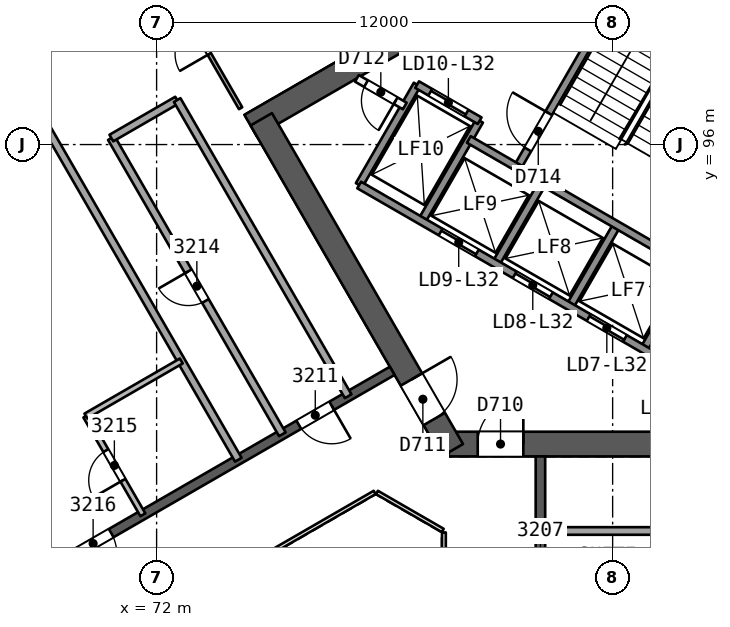
"""IFC4 building model, lengths in metres.
Left out: names, types, materials, properties, quantities, classifications, styles, units other than length and angle.
Written with IfcOpenShell. Run it as: python <this file> out.ifc"""

import sys

from ifc_helpers import new_model, si_unit, direction, frame, frame_2d, origin, place, context, subcontext, project, spatial, rectangle, extrude, element, fill, save


model = new_model("IFC4")
c1 = context("Model", 3, precision=1e-05, world=origin(), true_north=direction((0.0, 1.0)))
c2 = subcontext(c1, "Body", "Model", "MODEL_VIEW")
j1 = project(units=[si_unit("LENGTHUNIT", "METRE"), si_unit("PLANEANGLEUNIT", "RADIAN")], contexts=[c1])
p1 = place(None, origin())
s1 = spatial("IfcSite", under=j1, at=p1, CompositionType="ELEMENT")
p2 = place(p1, origin())
s2 = spatial("IfcBuilding", under=s1, at=p2, CompositionType="ELEMENT")
p3 = place(p2, frame((0.0, 0.0, 132.7)))
s3 = spatial("IfcBuildingStorey", under=s2, at=p3, CompositionType="ELEMENT", Elevation=132.7)
p4 = place(p3, frame((79.688, 88.119, 0.0), z_axis=(0.0, 0.0, 1.0), x_axis=(1.0, 0.0, 0.0)))
e1 = element("IfcWall", 1, at=p4, inside=s3, PredefinedType="SHEAR", context=c2, shape_type="SweptSolid", body=[
    extrude(rectangle(XDim=10.192, YDim=0.65, at=frame_2d((5.096, 0.0))), origin(), (0.0, 0.0, 1.0), 3.7),
])
p5 = place(p4, frame((0.762, 0.0, 0.0)))
e2 = element("IfcOpeningElement", 2, at=p5, cuts=e1, PredefinedType="OPENING", context=c2, shape_type="SweptSolid", body=[
    extrude(rectangle(XDim=1.2, YDim=2.1, at=frame_2d((0.6, 1.05))), frame((0.0, 0.335, 0.0), z_axis=(0.0, -1.0, 0.0), x_axis=(1.0, 0.0, 0.0)), (0.0, 0.0, 1.0), 0.671),
])
p6 = place(p3, frame((86.723, 103.575, 0.0), z_axis=(0.0, 0.0, 1.0), x_axis=(-0.866031824457, -0.499988878904, 0.0)))
e3 = element("IfcWall", 3, at=p6, inside=s3, PredefinedType="SHEAR", context=c2, shape_type="SweptSolid", body=[
    extrude(rectangle(XDim=14.146, YDim=0.65, at=frame_2d((7.073, 0.0))), origin(), (0.0, 0.0, 1.0), 3.7),
])
p7 = place(p3, frame((74.754, 96.665, 0.0), z_axis=(0.0, 0.0, 1.0), x_axis=(0.500011799426, -0.866018591275, 0.0)))
e4 = element("IfcWall", 4, at=p7, inside=s3, PredefinedType="SHEAR", context=c2, shape_type="SweptSolid", body=[
    extrude(rectangle(XDim=10.055, YDim=0.65, at=frame_2d((5.027, 0.0))), origin(), (0.0, 0.0, 1.0), 3.7),
])
p8 = place(p7, frame((7.905, 0.0, 0.0)))
e5 = element("IfcOpeningElement", 5, at=p8, cuts=e4, PredefinedType="OPENING", context=c2, shape_type="SweptSolid", body=[
    extrude(rectangle(XDim=1.2, YDim=2.1, at=frame_2d((0.6, 1.05))), frame((0.0, 0.335, 0.0), z_axis=(0.0, -1.0, 0.0), x_axis=(1.0, 0.0, 0.0)), (0.0, 0.0, 1.0), 0.671),
])
p9 = place(p3, frame((82.1, 72.206, 0.0), z_axis=(0.0, 0.0, 1.0), x_axis=(0.0, 1.0, 0.0)))
e6 = element("IfcWall", 6, at=p9, inside=s3, PredefinedType="SHEAR", context=c2, shape_type="SweptSolid", body=[
    extrude(rectangle(XDim=15.588, YDim=0.25, at=frame_2d((7.794, 0.0))), origin(), (0.0, 0.0, 1.0), 3.25),
])
p10 = place(p9, frame((2.306, 0.0, 0.0)))
e7 = element("IfcOpeningElement", 7, at=p10, cuts=e6, PredefinedType="OPENING", context=c2, shape_type="SweptSolid", body=[
    extrude(rectangle(XDim=1.0, YDim=2.1, at=frame_2d((0.5, 1.05))), frame((0.0, 0.135, 0.0), z_axis=(0.0, -1.0, 0.0), x_axis=(1.0, 0.0, 0.0)), (0.0, 0.0, 1.0), 0.271),
])
p11 = place(p9, frame((8.415, 0.0, 0.0)))
e8 = element("IfcOpeningElement", 8, at=p11, cuts=e6, PredefinedType="OPENING", context=c2, shape_type="SweptSolid", body=[
    extrude(rectangle(XDim=1.0, YDim=2.1, at=frame_2d((0.5, 1.05))), frame((0.0, 0.135, 0.0), z_axis=(0.0, -1.0, 0.0), x_axis=(1.0, 0.0, 0.0)), (0.0, 0.0, 1.0), 0.271),
])
p12 = place(p9, frame((12.127, 0.0, 0.0)))
e9 = element("IfcOpeningElement", 9, at=p12, cuts=e6, PredefinedType="OPENING", context=c2, shape_type="SweptSolid", body=[
    extrude(rectangle(XDim=1.0, YDim=2.1, at=frame_2d((0.5, 1.05))), frame((0.0, 0.135, 0.0), z_axis=(0.0, -1.0, 0.0), x_axis=(1.0, 0.0, 0.0)), (0.0, 0.0, 1.0), 0.271),
])
p13 = place(p3, frame((78.2, 90.046, 0.0), z_axis=(0.0, 0.0, 1.0), x_axis=(-0.866026492143, -0.499998114903, 0.0)))
e10 = element("IfcWall", 10, at=p13, inside=s3, PredefinedType="SHEAR", context=c2, shape_type="SweptSolid", body=[
    extrude(rectangle(XDim=15.588, YDim=0.25, at=frame_2d((7.794, 0.0))), origin(), (0.0, 0.0, 1.0), 3.25),
])
p14 = place(p13, frame((1.838, 0.0, 0.0)))
e11 = element("IfcOpeningElement", 11, at=p14, cuts=e10, PredefinedType="OPENING", context=c2, shape_type="SweptSolid", body=[
    extrude(rectangle(XDim=1.0, YDim=2.1, at=frame_2d((0.5, 1.05))), frame((0.0, 0.135, 0.0), z_axis=(0.0, -1.0, 0.0), x_axis=(1.0, 0.0, 0.0)), (0.0, 0.0, 1.0), 0.271),
])
p15 = place(p13, frame((8.538, 0.0, 0.0)))
e12 = element("IfcOpeningElement", 12, at=p15, cuts=e10, PredefinedType="OPENING", context=c2, shape_type="SweptSolid", body=[
    extrude(rectangle(XDim=1.1, YDim=2.1, at=frame_2d((0.55, 1.05))), frame((0.0, 0.135, 0.0), z_axis=(0.0, -1.0, 0.0), x_axis=(1.0, 0.0, 0.0)), (0.0, 0.0, 1.0), 0.271),
])
p16 = place(p13, frame((12.594, 0.0, 0.0)))
e13 = element("IfcOpeningElement", 13, at=p16, cuts=e10, PredefinedType="OPENING", context=c2, shape_type="SweptSolid", body=[
    extrude(rectangle(XDim=1.0, YDim=2.1, at=frame_2d((0.5, 1.05))), frame((0.0, 0.135, 0.0), z_axis=(0.0, -1.0, 0.0), x_axis=(1.0, 0.0, 0.0)), (0.0, 0.0, 1.0), 0.271),
])
p17 = place(p3, frame((82.1, 85.833, 0.0), z_axis=(0.0, 0.0, 1.0), x_axis=(1.0, 0.0, 0.0)))
e14 = element("IfcWall", 14, at=p17, inside=s3, PredefinedType="PARTITIONING", context=c2, shape_type="SweptSolid", body=[
    extrude(rectangle(XDim=9.0, YDim=0.2, at=frame_2d((4.5, 0.0))), origin(), (0.0, 0.0, 1.0), 3.25),
])
p18 = place(p17, frame((4.05, 0.0, 0.0)))
e15 = element("IfcOpeningElement", 15, at=p18, cuts=e14, PredefinedType="OPENING", context=c2, shape_type="SweptSolid", body=[
    extrude(rectangle(XDim=0.9, YDim=2.1, at=frame_2d((0.45, 1.05))), frame((0.0, 0.11, 0.0), z_axis=(0.0, -1.0, 0.0), x_axis=(1.0, 0.0, 0.0)), (0.0, 0.0, 1.0), 0.221),
])
p19 = place(p3, frame((74.21, 96.956, 0.0), z_axis=(0.0, 0.0, 1.0), x_axis=(-0.49999760543, 0.866026786286, 0.0)))
e16 = element("IfcWall", 16, at=p19, inside=s3, PredefinedType="PARTITIONING", context=c2, shape_type="SweptSolid", body=[
    extrude(rectangle(XDim=4.199, YDim=0.1, at=frame_2d((2.099, 0.0))), origin(), (0.0, 0.0, 1.0), 3.25),
])
p20 = place(p19, frame((1.649, 0.0, 0.0)))
e17 = element("IfcOpeningElement", 17, at=p20, cuts=e16, PredefinedType="OPENING", context=c2, shape_type="SweptSolid", body=[
    extrude(rectangle(XDim=0.9, YDim=2.1, at=frame_2d((0.45, 1.05))), frame((0.0, 0.061, 0.0), z_axis=(0.0, -1.0, 0.0), x_axis=(1.0, 0.0, 0.0)), (0.0, 0.0, 1.0), 0.121),
])
p21 = place(p3, frame((75.309, 88.377, 0.0), z_axis=(0.0, 0.0, 1.0), x_axis=(-0.5000018851, 0.866024315419, 0.0)))
e18 = element("IfcWall", 18, at=p21, inside=s3, PredefinedType="PARTITIONING", context=c2, shape_type="SweptSolid", body=[
    extrude(rectangle(XDim=9.0, YDim=0.2, at=frame_2d((4.5, 0.0))), origin(), (0.0, 0.0, 1.0), 3.25),
])
p22 = place(p21, frame((4.05, 0.0, 0.0)))
e19 = element("IfcOpeningElement", 19, at=p22, cuts=e18, PredefinedType="OPENING", context=c2, shape_type="SweptSolid", body=[
    extrude(rectangle(XDim=0.9, YDim=2.1, at=frame_2d((0.45, 1.05))), frame((0.0, 0.11, 0.0), z_axis=(0.0, -1.0, 0.0), x_axis=(1.0, 0.0, 0.0)), (0.0, 0.0, 1.0), 0.221),
])
p23 = place(p3, frame((70.809, 96.171, 0.0), z_axis=(0.0, 0.0, 1.0), x_axis=(0.866010750942, 0.50002537861, 0.0)))
e20 = element("IfcWall", 20, at=p23, inside=s3, PredefinedType="PARTITIONING", context=c2, shape_type="SweptSolid", body=[
    extrude(rectangle(XDim=2.0, YDim=0.2, at=frame_2d((1.0, 0.0))), origin(), (0.0, 0.0, 1.0), 3.25),
])
p24 = place(p3, frame((72.541, 97.171, 0.0), z_axis=(0.0, 0.0, 1.0), x_axis=(0.5000018851, -0.866024315419, 0.0)))
e21 = element("IfcWall", 21, at=p24, inside=s3, PredefinedType="PARTITIONING", context=c2, shape_type="SweptSolid", body=[
    extrude(rectangle(XDim=9.0, YDim=0.2, at=frame_2d((4.5, 0.0))), origin(), (0.0, 0.0, 1.0), 3.25),
])
p25 = place(p3, frame((68.061, 98.254, 0.0), z_axis=(0.0, 0.0, 1.0), x_axis=(0.499987977232, -0.866032345022, 0.0)))
e22 = element("IfcWall", 22, at=p25, inside=s3, PredefinedType="PARTITIONING", context=c2, shape_type="SweptSolid", body=[
    extrude(rectangle(XDim=12.177, YDim=0.2, at=frame_2d((6.089, 0.0))), origin(), (0.0, 0.0, 1.0), 3.25),
])
p26 = place(p3, frame((71.638, 86.258, 0.0), z_axis=(0.0, 0.0, 1.0), x_axis=(-0.499990139034, 0.866031096941, 0.0)))
e23 = element("IfcWall", 23, at=p26, inside=s3, PredefinedType="PARTITIONING", context=c2, shape_type="SweptSolid", body=[
    extrude(rectangle(XDim=3.0, YDim=0.15, at=frame_2d((1.5, 0.0))), origin(), (0.0, 0.0, 1.0), 3.25),
])
p27 = place(p26, frame((1.05, 0.0, 0.0)))
e24 = element("IfcOpeningElement", 24, at=p27, cuts=e23, PredefinedType="OPENING", context=c2, shape_type="SweptSolid", body=[
    extrude(rectangle(XDim=0.9, YDim=2.1, at=frame_2d((0.45, 1.05))), frame((0.0, 0.085, 0.0), z_axis=(0.0, -1.0, 0.0), x_axis=(1.0, 0.0, 0.0)), (0.0, 0.0, 1.0), 0.171),
])
p28 = place(p3, frame((70.138, 88.856, 0.0), z_axis=(0.0, 0.0, 1.0), x_axis=(0.866032775405, 0.499987231761, 0.0)))
e25 = element("IfcWall", 25, at=p28, inside=s3, PredefinedType="PARTITIONING", context=c2, shape_type="SweptSolid", body=[
    extrude(rectangle(XDim=2.9, YDim=0.15, at=frame_2d((1.45, 0.0))), origin(), (0.0, 0.0, 1.0), 3.25),
])
p29 = place(p3, frame((41.097, 82.858, 0.0), z_axis=(0.0, 0.0, 1.0), x_axis=(0.866026276916, 0.499998487688, 0.0)))
e26 = element("IfcWall", 26, at=p29, inside=s3, PredefinedType="SOLIDWALL", context=c2, shape_type="SweptSolid", body=[
    extrude(rectangle(XDim=55.864, YDim=0.3, at=frame_2d((27.932, 0.0))), origin(), (0.0, 0.0, 1.0), 3.25),
])
p30 = place(p29, frame((26.888, 0.0, 0.0)))
e27 = element("IfcOpeningElement", 27, at=p30, cuts=e26, PredefinedType="OPENING", context=c2, shape_type="SweptSolid", body=[
    extrude(rectangle(XDim=2.4, YDim=2.4, at=frame_2d((1.2, 1.2))), frame((0.0, 0.161, 0.0), z_axis=(0.0, -1.0, 0.0), x_axis=(1.0, 0.0, 0.0)), (0.0, 0.0, 1.0), 0.321),
])
p31 = place(p29, frame((32.188, 0.0, 0.0)))
e28 = element("IfcOpeningElement", 28, at=p31, cuts=e26, PredefinedType="OPENING", context=c2, shape_type="SweptSolid", body=[
    extrude(rectangle(XDim=2.4, YDim=2.4, at=frame_2d((1.2, 1.2))), frame((0.0, 0.161, 0.0), z_axis=(0.0, -1.0, 0.0), x_axis=(1.0, 0.0, 0.0)), (0.0, 0.0, 1.0), 0.321),
])
p32 = place(p29, frame((43.384, 0.0, 0.0)))
e29 = element("IfcOpeningElement", 29, at=p32, cuts=e26, PredefinedType="OPENING", context=c2, shape_type="SweptSolid", body=[
    extrude(rectangle(XDim=2.4, YDim=2.4, at=frame_2d((1.2, 1.2))), frame((0.0, 0.161, 0.0), z_axis=(0.0, -1.0, 0.0), x_axis=(1.0, 0.0, 0.0)), (0.0, 0.0, 1.0), 0.321),
])
p33 = place(p29, frame((21.432, 0.0, 0.0)))
e30 = element("IfcOpeningElement", 30, at=p33, cuts=e26, PredefinedType="OPENING", context=c2, shape_type="SweptSolid", body=[
    extrude(rectangle(XDim=2.4, YDim=2.4, at=frame_2d((1.2, 1.2))), frame((0.0, 0.161, 0.0), z_axis=(0.0, -1.0, 0.0), x_axis=(1.0, 0.0, 0.0)), (0.0, 0.0, 1.0), 0.321),
])
p34 = place(p29, frame((10.029, 0.0, 0.0)))
e31 = element("IfcOpeningElement", 31, at=p34, cuts=e26, PredefinedType="OPENING", context=c2, shape_type="SweptSolid", body=[
    extrude(rectangle(XDim=2.4, YDim=2.4, at=frame_2d((1.2, 1.2))), frame((0.0, 0.161, 0.0), z_axis=(0.0, -1.0, 0.0), x_axis=(1.0, 0.0, 0.0)), (0.0, 0.0, 1.0), 0.321),
])
for number, where, z_axis, x_axis in (
    (32, (84.821, 90.611, 0.0), (0.0, 0.0, 1.0), (0.5, 0.866, 0.0)),
    (33, (82.873, 91.736, 0.0), (0.0, 0.0, 1.0), (0.5, 0.866, 0.0)),
    (34, (80.924, 92.861, 0.0), (0.0, 0.0, 1.0), (0.5, 0.866, 0.0)),
):
    element("IfcWall", number, at=place(p3, frame(where, z_axis=z_axis, x_axis=x_axis)), inside=s3, PredefinedType="SOLIDWALL", context=c2, shape_type="SweptSolid", body=[
        extrude(rectangle(XDim=2.48, YDim=0.2, at=frame_2d((1.24, 0.0))), origin(), (0.0, 0.0, 1.0), 3.25),
    ])
p35 = place(p3, frame((81.493, 95.396, 0.0), z_axis=(0.0, 0.0, 1.0), x_axis=(0.500006057782, 0.866021906294, 0.0)))
e35 = element("IfcWall", 35, at=p35, inside=s3, PredefinedType="SOLIDWALL", context=c2, shape_type="SweptSolid", body=[
    extrude(rectangle(XDim=7.7, YDim=0.2, at=frame_2d((3.85, 0.0))), origin(), (0.0, 0.0, 1.0), 3.25),
])
p36 = place(p35, frame((0.55, 0.0, 0.0)))
e36 = element("IfcOpeningElement", 36, at=p36, cuts=e35, PredefinedType="OPENING", context=c2, shape_type="SweptSolid", body=[
    extrude(rectangle(XDim=1.1, YDim=2.1, at=frame_2d((0.55, 1.05))), frame((0.0, 0.11, 0.0), z_axis=(0.0, -1.0, 0.0), x_axis=(1.0, 0.0, 0.0)), (0.0, 0.0, 1.0), 0.221),
])
for number, where, z_axis, x_axis in (
    (37, (78.976, 93.986, 0.0), (0.0, 0.0, 1.0), (0.5, 0.866, 0.0)),
    (38, (77.33, 94.936, 0.0), (0.0, 0.0, 1.0), (0.5, 0.866, 0.0)),
):
    element("IfcWall", number, at=place(p3, frame(where, z_axis=z_axis, x_axis=x_axis)), inside=s3, PredefinedType="SOLIDWALL", context=c2, shape_type="SweptSolid", body=[
        extrude(rectangle(XDim=3.05, YDim=0.2, at=frame_2d((1.525, 0.0))), origin(), (0.0, 0.0, 1.0), 3.25),
    ])
p37 = place(p3, frame((86.77, 89.486, 0.0), z_axis=(0.0, 0.0, 1.0), x_axis=(-0.86601811187, 0.500012629753, 0.0)))
e39 = element("IfcWall", 39, at=p37, inside=s3, PredefinedType="SOLIDWALL", context=c2, shape_type="SweptSolid", body=[
    extrude(rectangle(XDim=10.9, YDim=0.2, at=frame_2d((5.45, 0.0))), origin(), (0.0, 0.0, 1.0), 3.25),
])
p38 = place(p37, frame((0.575, 0.0, 0.0)))
e40 = element("IfcOpeningElement", 40, at=p38, cuts=e39, PredefinedType="OPENING", context=c2, shape_type="SweptSolid", body=[
    extrude(rectangle(XDim=1.1, YDim=2.1, at=frame_2d((0.55, 1.05))), frame((0.0, 0.11, 0.0), z_axis=(0.0, -1.0, 0.0), x_axis=(1.0, 0.0, 0.0)), (0.0, 0.0, 1.0), 0.221),
])
p39 = place(p37, frame((2.825, 0.0, 0.0)))
e41 = element("IfcOpeningElement", 41, at=p39, cuts=e39, PredefinedType="OPENING", context=c2, shape_type="SweptSolid", body=[
    extrude(rectangle(XDim=1.1, YDim=2.1, at=frame_2d((0.55, 1.05))), frame((0.0, 0.11, 0.0), z_axis=(0.0, -1.0, 0.0), x_axis=(1.0, 0.0, 0.0)), (0.0, 0.0, 1.0), 0.221),
])
p40 = place(p37, frame((5.075, 0.0, 0.0)))
e42 = element("IfcOpeningElement", 42, at=p40, cuts=e39, PredefinedType="OPENING", context=c2, shape_type="SweptSolid", body=[
    extrude(rectangle(XDim=1.1, YDim=2.1, at=frame_2d((0.55, 1.05))), frame((0.0, 0.11, 0.0), z_axis=(0.0, -1.0, 0.0), x_axis=(1.0, 0.0, 0.0)), (0.0, 0.0, 1.0), 0.221),
])
p41 = place(p37, frame((7.325, 0.0, 0.0)))
e43 = element("IfcOpeningElement", 43, at=p41, cuts=e39, PredefinedType="OPENING", context=c2, shape_type="SweptSolid", body=[
    extrude(rectangle(XDim=1.1, YDim=2.1, at=frame_2d((0.55, 1.05))), frame((0.0, 0.11, 0.0), z_axis=(0.0, -1.0, 0.0), x_axis=(1.0, 0.0, 0.0)), (0.0, 0.0, 1.0), 0.221),
])
p42 = place(p3, frame((78.53, 97.014, 0.0), z_axis=(0.0, 0.0, 1.0), x_axis=(-0.866045896294, 0.499964504253, 0.0)))
e44 = element("IfcWall", 44, at=p42, inside=s3, PredefinedType="PARTITIONING", context=c2, shape_type="SweptSolid", body=[
    extrude(rectangle(XDim=1.455, YDim=0.2, at=frame_2d((0.728, 0.0))), origin(), (0.0, 0.0, 1.0), 3.25),
])
p43 = place(p42, frame((0.278, 0.0, 0.0)))
e45 = element("IfcOpeningElement", 45, at=p43, cuts=e44, PredefinedType="OPENING", context=c2, shape_type="SweptSolid", body=[
    extrude(rectangle(XDim=0.9, YDim=2.1, at=frame_2d((0.45, 1.05))), frame((0.0, 0.11, 0.0), z_axis=(0.0, -1.0, 0.0), x_axis=(1.0, 0.0, 0.0)), (0.0, 0.0, 1.0), 0.221),
])
p44 = place(p3, frame((88.01, 91.634, 0.0), z_axis=(0.0, 0.0, 1.0), x_axis=(-0.866024315419, 0.5000018851, 0.0)))
e46 = element("IfcWall", 46, at=p44, inside=s3, PredefinedType="SOLIDWALL", context=c2, shape_type="SweptSolid", body=[
    extrude(rectangle(XDim=9.0, YDim=0.2, at=frame_2d((4.5, 0.0))), origin(), (0.0, 0.0, 1.0), 3.25),
])
p45 = place(p3, frame((80.5, 96.627, 0.0), z_axis=(0.0, 0.0, 1.0), x_axis=(-0.86601224135, 0.500022797313, 0.0)))
e47 = element("IfcWall", 47, at=p45, inside=s3, PredefinedType="SOLIDWALL", context=c2, shape_type="SweptSolid", body=[
    extrude(rectangle(XDim=1.9, YDim=0.2, at=frame_2d((0.95, 0.0))), origin(), (0.0, 0.0, 1.0), 3.25),
])
p46 = place(p45, frame((0.4, 0.0, 0.0)))
e48 = element("IfcOpeningElement", 48, at=p46, cuts=e47, PredefinedType="OPENING", context=c2, shape_type="SweptSolid", body=[
    extrude(rectangle(XDim=1.1, YDim=2.1, at=frame_2d((0.55, 1.05))), frame((0.0, 0.11, 0.0), z_axis=(0.0, -1.0, 0.0), x_axis=(1.0, 0.0, 0.0)), (0.0, 0.0, 1.0), 0.221),
])
p47 = place(p3, frame((79.56, 74.206, 0.0), z_axis=(0.0, 0.0, 1.0), x_axis=(0.0, 1.0, 0.0)))
e49 = element("IfcWall", 49, at=p47, inside=s3, PredefinedType="PARTITIONING", context=c2, shape_type="SweptSolid", body=[
    extrude(rectangle(XDim=11.588, YDim=0.1, at=frame_2d((5.794, 0.0))), origin(), (0.0, 0.0, 1.0), 3.25),
])
p48 = place(p3, frame((79.53, 85.846, 0.0), z_axis=(0.0, 0.0, 1.0), x_axis=(-0.866041268327, 0.499972520799, 0.0)))
e50 = element("IfcWall", 50, at=p48, inside=s3, PredefinedType="PARTITIONING", context=c2, shape_type="SweptSolid", body=[
    extrude(rectangle(XDim=2.0, YDim=0.1, at=frame_2d((1.0, 0.0))), origin(), (0.0, 0.0, 1.0), 3.25),
])
p49 = place(p3, frame((77.738, 86.846, 0.0), z_axis=(0.0, 0.0, 1.0), x_axis=(-0.866026658274, -0.499997827154, 0.0)))
e51 = element("IfcWall", 51, at=p49, inside=s3, PredefinedType="PARTITIONING", context=c2, shape_type="SweptSolid", body=[
    extrude(rectangle(XDim=11.588, YDim=0.1, at=frame_2d((5.794, 0.0))), origin(), (0.0, 0.0, 1.0), 3.25),
])
p50 = place(p14, origin())
e52 = element("IfcDoor", 52, at=p50, inside=s3, OperationType="SINGLE_SWING_LEFT", PredefinedType="NOTDEFINED", context=c2, shape_type="SweptSolid", body=[
    extrude(rectangle(XDim=1.0, YDim=2.1, at=frame_2d((0.5, 1.05))), frame((0.0, 0.025, 0.0), z_axis=(0.0, -1.0, 0.0), x_axis=(1.0, 0.0, 0.0)), (0.0, 0.0, 1.0), 0.05),
])
fill(e11, e52)
p51 = place(p20, origin())
e53 = element("IfcDoor", 53, at=p51, inside=s3, OperationType="SINGLE_SWING_LEFT", PredefinedType="NOTDEFINED", context=c2, shape_type="SweptSolid", body=[
    extrude(rectangle(XDim=0.9, YDim=2.1, at=frame_2d((0.45, 1.05))), frame((0.0, 0.025, 0.0), z_axis=(0.0, -1.0, 0.0), x_axis=(1.0, 0.0, 0.0)), (0.0, 0.0, 1.0), 0.05),
])
fill(e17, e53)
p52 = place(p22, origin())
e54 = element("IfcDoor", 54, at=p52, inside=s3, OperationType="SINGLE_SWING_RIGHT", PredefinedType="NOTDEFINED", context=c2, shape_type="SweptSolid", body=[
    extrude(rectangle(XDim=0.9, YDim=2.1, at=frame_2d((0.45, 1.05))), frame((0.0, 0.025, 0.0), z_axis=(0.0, -1.0, 0.0), x_axis=(1.0, 0.0, 0.0)), (0.0, 0.0, 1.0), 0.05),
])
fill(e19, e54)
p53 = place(p27, origin())
e55 = element("IfcDoor", 55, at=p53, inside=s3, OperationType="SINGLE_SWING_LEFT", PredefinedType="NOTDEFINED", context=c2, shape_type="SweptSolid", body=[
    extrude(rectangle(XDim=0.9, YDim=2.1, at=frame_2d((0.45, 1.05))), frame((0.0, 0.025, 0.0), z_axis=(0.0, -1.0, 0.0), x_axis=(1.0, 0.0, 0.0)), (0.0, 0.0, 1.0), 0.05),
])
fill(e24, e55)
p54 = place(p15, origin())
e56 = element("IfcDoor", 56, at=p54, inside=s3, OperationType="SINGLE_SWING_RIGHT", PredefinedType="NOTDEFINED", context=c2, shape_type="SweptSolid", body=[
    extrude(rectangle(XDim=1.1, YDim=2.1, at=frame_2d((0.55, 1.05))), frame((0.0, 0.025, 0.0), z_axis=(0.0, -1.0, 0.0), x_axis=(1.0, 0.0, 0.0)), (0.0, 0.0, 1.0), 0.05),
])
fill(e12, e56)
p55 = place(p5, origin())
e57 = element("IfcDoor", 57, at=p55, inside=s3, OperationType="SINGLE_SWING_RIGHT", PredefinedType="NOTDEFINED", context=c2, shape_type="SweptSolid", body=[
    extrude(rectangle(XDim=1.2, YDim=2.1, at=frame_2d((0.6, 1.05))), frame((0.0, 0.025, 0.0), z_axis=(0.0, -1.0, 0.0), x_axis=(1.0, 0.0, 0.0)), (0.0, 0.0, 1.0), 0.05),
])
fill(e2, e57)
p56 = place(p8, origin())
e58 = element("IfcDoor", 58, at=p56, inside=s3, OperationType="SINGLE_SWING_LEFT", PredefinedType="NOTDEFINED", context=c2, shape_type="SweptSolid", body=[
    extrude(rectangle(XDim=1.2, YDim=2.1, at=frame_2d((0.6, 1.05))), frame((0.0, 0.025, 0.0), z_axis=(0.0, -1.0, 0.0), x_axis=(1.0, 0.0, 0.0)), (0.0, 0.0, 1.0), 0.05),
])
fill(e5, e58)
p57 = place(p39, origin())
e59 = element("IfcDoor", 59, at=p57, inside=s3, OperationType="SLIDING_TO_LEFT", PredefinedType="NOTDEFINED", context=c2, shape_type="SweptSolid", body=[
    extrude(rectangle(XDim=1.1, YDim=2.1, at=frame_2d((0.55, 1.05))), frame((0.0, 0.025, 0.0), z_axis=(0.0, -1.0, 0.0), x_axis=(1.0, 0.0, 0.0)), (0.0, 0.0, 1.0), 0.05),
])
fill(e41, e59)
p58 = place(p40, origin())
e60 = element("IfcDoor", 60, at=p58, inside=s3, OperationType="SLIDING_TO_RIGHT", PredefinedType="NOTDEFINED", context=c2, shape_type="SweptSolid", body=[
    extrude(rectangle(XDim=1.1, YDim=2.1, at=frame_2d((0.55, 1.05))), frame((0.0, 0.025, 0.0), z_axis=(0.0, -1.0, 0.0), x_axis=(1.0, 0.0, 0.0)), (0.0, 0.0, 1.0), 0.05),
])
fill(e42, e60)
p59 = place(p41, origin())
e61 = element("IfcDoor", 61, at=p59, inside=s3, OperationType="SLIDING_TO_LEFT", PredefinedType="NOTDEFINED", context=c2, shape_type="SweptSolid", body=[
    extrude(rectangle(XDim=1.1, YDim=2.1, at=frame_2d((0.55, 1.05))), frame((0.0, 0.025, 0.0), z_axis=(0.0, -1.0, 0.0), x_axis=(1.0, 0.0, 0.0)), (0.0, 0.0, 1.0), 0.05),
])
fill(e43, e61)
p60 = place(p46, origin())
e62 = element("IfcDoor", 62, at=p60, inside=s3, OperationType="SLIDING_TO_RIGHT", PredefinedType="NOTDEFINED", context=c2, shape_type="SweptSolid", body=[
    extrude(rectangle(XDim=1.1, YDim=2.1, at=frame_2d((0.55, 1.05))), frame((0.0, 0.025, 0.0), z_axis=(0.0, -1.0, 0.0), x_axis=(1.0, 0.0, 0.0)), (0.0, 0.0, 1.0), 0.05),
])
fill(e48, e62)
p61 = place(p43, origin())
e63 = element("IfcDoor", 63, at=p61, inside=s3, OperationType="SINGLE_SWING_LEFT", PredefinedType="NOTDEFINED", context=c2, shape_type="SweptSolid", body=[
    extrude(rectangle(XDim=0.9, YDim=2.1, at=frame_2d((0.45, 1.05))), frame((0.0, 0.025, 0.0), z_axis=(0.0, -1.0, 0.0), x_axis=(1.0, 0.0, 0.0)), (0.0, 0.0, 1.0), 0.05),
])
fill(e45, e63)
p62 = place(p36, origin())
e64 = element("IfcDoor", 64, at=p62, inside=s3, OperationType="SINGLE_SWING_RIGHT", PredefinedType="NOTDEFINED", context=c2, shape_type="SweptSolid", body=[
    extrude(rectangle(XDim=1.1, YDim=2.1, at=frame_2d((0.55, 1.05))), frame((0.0, 0.025, 0.0), z_axis=(0.0, -1.0, 0.0), x_axis=(1.0, 0.0, 0.0)), (0.0, 0.0, 1.0), 0.05),
])
fill(e36, e64)
save(model, sys.argv[1])
